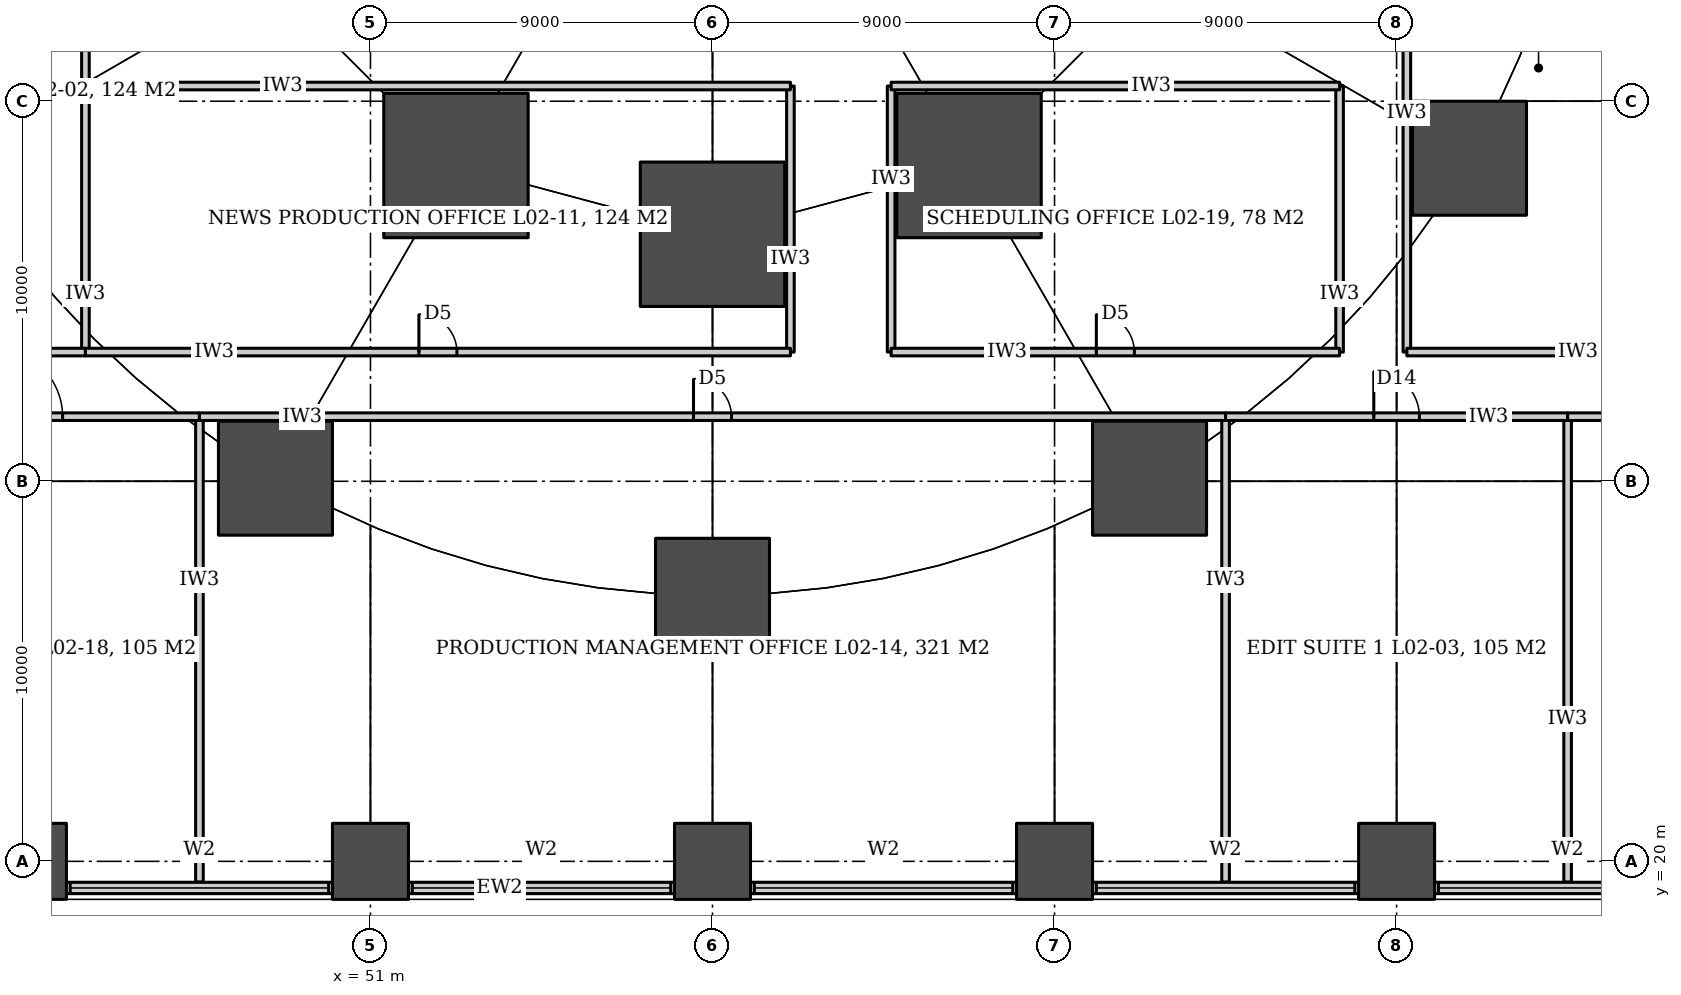
"""IFC4 building model, lengths in metres.
Left out: names, types, materials, properties, quantities, classifications, styles, units other than length and angle.
Written with IfcOpenShell. Run it as: python <this file> out.ifc"""

import sys

from ifc_helpers import new_model, si_unit, direction, frame, frame_2d, origin, origin_2d, place, context, subcontext, project, spatial, rectangle, circle, extrude, element, fill, save


model = new_model("IFC4")
c1 = context("Model", 3, precision=1e-05, world=origin(), true_north=direction((0.0, 1.0)))
c2 = subcontext(c1, "Body", "Model", "MODEL_VIEW")
j1 = project(units=[si_unit("LENGTHUNIT", "METRE"), si_unit("PLANEANGLEUNIT", "RADIAN")], contexts=[c1])
p1 = place(None, origin())
s1 = spatial("IfcSite", under=j1, at=p1, CompositionType="ELEMENT")
p2 = place(p1, origin())
s2 = spatial("IfcBuilding", under=s1, at=p2, CompositionType="ELEMENT")
p3 = place(p2, frame((0.0, 0.0, 15.0)))
s3 = spatial("IfcBuildingStorey", under=s2, at=p3, CompositionType="ELEMENT", Elevation=15.0)
for number, where, z_axis, x_axis in (
    (1, (42.0, 20.0, 0.0), (0.0, 0.0, 1.0), (1.0, 0.0, 0.0)),
    (2, (51.0, 20.0, 0.0), (0.0, 0.0, 1.0), (1.0, 0.0, 0.0)),
    (3, (60.0, 20.0, 0.0), (0.0, 0.0, 1.0), (1.0, 0.0, 0.0)),
    (4, (69.0, 20.0, 0.0), (0.0, 0.0, 1.0), (1.0, 0.0, 0.0)),
    (5, (78.0, 20.0, 0.0), (0.0, 0.0, 1.0), (1.0, 0.0, 0.0)),
):
    element("IfcColumn", number, at=place(p3, frame(where, z_axis=z_axis, x_axis=x_axis)), inside=s3, PredefinedType="COLUMN", context=c2, shape_type="SweptSolid", body=[
        extrude(rectangle(XDim=2.0, YDim=2.0, at=origin_2d()), origin(), (0.0, 0.0, 1.0), 5.0),
    ])
for number, where, z_axis, x_axis in (
    (6, (48.5, 30.081, 0.0), (0.0, 0.0, 1.0), (1.0, 0.0, 0.0)),
    (7, (60.0, 27.0, 0.0), (0.0, 0.0, 1.0), (1.0, 0.0, 0.0)),
    (8, (71.5, 30.081, 0.0), (0.0, 0.0, 1.0), (1.0, 0.0, 0.0)),
    (9, (79.919, 38.5, 0.0), (0.0, 0.0, 1.0), (1.0, 0.0, 0.0)),
):
    element("IfcColumn", number, at=place(p3, frame(where, z_axis=z_axis, x_axis=x_axis)), inside=s3, PredefinedType="COLUMN", context=c2, shape_type="SweptSolid", body=[
        extrude(circle(Radius=1.5, at=origin_2d()), origin(), (0.0, 0.0, 1.0), 5.0),
    ])
for number, where, z_axis, x_axis in (
    (10, (53.25, 38.309, 0.0), (0.0, 0.0, 1.0), (1.0, 0.0, 0.0)),
    (11, (60.0, 36.5, 0.0), (0.0, 0.0, 1.0), (1.0, 0.0, 0.0)),
    (12, (66.75, 38.309, 0.0), (0.0, 0.0, 1.0), (1.0, 0.0, 0.0)),
):
    element("IfcColumn", number, at=place(p3, frame(where, z_axis=z_axis, x_axis=x_axis)), inside=s3, PredefinedType="COLUMN", context=c2, shape_type="SweptSolid", body=[
        extrude(circle(Radius=1.9, at=origin_2d()), origin(), (0.0, 0.0, 1.0), 5.0),
    ])
p4 = place(p3, frame((43.5, 33.4, 0.0), z_axis=(0.0, 0.0, 1.0), x_axis=(0.0, 1.0, 0.0)))
e13 = element("IfcWall", 13, at=p4, inside=s3, PredefinedType="PARTITIONING", context=c2, shape_type="SweptSolid", body=[
    extrude(rectangle(XDim=7.0, YDim=0.2, at=frame_2d((3.5, 0.0))), origin(), (0.0, 0.0, 1.0), 2.08),
])
p5 = place(p3, frame((43.5, 40.4, 0.0), z_axis=(0.0, 0.0, 1.0), x_axis=(0.0, 1.0, 0.0)))
e14 = element("IfcWall", 14, at=p5, inside=s3, PredefinedType="PARTITIONING", context=c2, shape_type="SweptSolid", body=[
    extrude(rectangle(XDim=7.95, YDim=0.2, at=frame_2d((3.975, 0.0))), origin(), (0.0, 0.0, 1.0), 2.08),
])
p6 = place(p3, frame((46.5, 19.455, 0.0), z_axis=(0.0, 0.0, 1.0), x_axis=(0.0, 1.0, 0.0)))
e15 = element("IfcWall", 15, at=p6, inside=s3, PredefinedType="PARTITIONING", context=c2, shape_type="SweptSolid", body=[
    extrude(rectangle(XDim=12.245, YDim=0.2, at=frame_2d((6.123, 0.0))), origin(), (0.0, 0.0, 1.0), 2.68),
])
p7 = place(p3, frame((62.05, 33.4, 0.0), z_axis=(0.0, 0.0, 1.0), x_axis=(0.0, 1.0, 0.0)))
e16 = element("IfcWall", 16, at=p7, inside=s3, PredefinedType="PARTITIONING", context=c2, shape_type="SweptSolid", body=[
    extrude(rectangle(XDim=7.0, YDim=0.2, at=frame_2d((3.5, 0.0))), origin(), (0.0, 0.0, 1.0), 2.08),
])
p8 = place(p3, frame((64.7, 33.4, 0.0), z_axis=(0.0, 0.0, 1.0), x_axis=(0.0, 1.0, 0.0)))
e17 = element("IfcWall", 17, at=p8, inside=s3, PredefinedType="PARTITIONING", context=c2, shape_type="SweptSolid", body=[
    extrude(rectangle(XDim=7.0, YDim=0.2, at=frame_2d((3.5, 0.0))), origin(), (0.0, 0.0, 1.0), 1.48),
])
p9 = place(p3, frame((73.5, 19.455, 0.0), z_axis=(0.0, 0.0, 1.0), x_axis=(0.0, 1.0, 0.0)))
e18 = element("IfcWall", 18, at=p9, inside=s3, PredefinedType="PARTITIONING", context=c2, shape_type="SweptSolid", body=[
    extrude(rectangle(XDim=12.245, YDim=0.2, at=frame_2d((6.123, 0.0))), origin(), (0.0, 0.0, 1.0), 2.68),
])
p10 = place(p3, frame((76.5, 33.4, 0.0), z_axis=(0.0, 0.0, 1.0), x_axis=(0.0, 1.0, 0.0)))
e19 = element("IfcWall", 19, at=p10, inside=s3, PredefinedType="PARTITIONING", context=c2, shape_type="SweptSolid", body=[
    extrude(rectangle(XDim=7.0, YDim=0.2, at=frame_2d((3.5, 0.0))), origin(), (0.0, 0.0, 1.0), 2.08),
])
p11 = place(p3, frame((78.27, 33.4, 0.0), z_axis=(0.0, 0.0, 1.0), x_axis=(0.0, 1.0, 0.0)))
e20 = element("IfcWall", 20, at=p11, inside=s3, PredefinedType="PARTITIONING", context=c2, shape_type="SweptSolid", body=[
    extrude(rectangle(XDim=14.95, YDim=0.2, at=frame_2d((7.475, 0.0))), origin(), (0.0, 0.0, 1.0), 2.08),
])
p12 = place(p3, frame((82.5, 19.455, 0.0), z_axis=(0.0, 0.0, 1.0), x_axis=(0.0, 1.0, 0.0)))
e21 = element("IfcWall", 21, at=p12, inside=s3, PredefinedType="PARTITIONING", context=c2, shape_type="SweptSolid", body=[
    extrude(rectangle(XDim=12.245, YDim=0.2, at=frame_2d((6.123, 0.0))), origin(), (0.0, 0.0, 1.0), 2.68),
])
p13 = place(p3, frame((37.5, 31.7, 0.0), z_axis=(0.0, 0.0, 1.0), x_axis=(1.0, 0.0, 0.0)))
e22 = element("IfcWall", 22, at=p13, inside=s3, PredefinedType="PARTITIONING", context=c2, shape_type="SweptSolid", body=[
    extrude(rectangle(XDim=9.0, YDim=0.2, at=frame_2d((4.5, 0.0))), origin(), (0.0, 0.0, 1.0), 2.68),
])
p14 = place(p13, frame((3.6, 0.0, 0.0)))
e23 = element("IfcOpeningElement", 23, at=p14, cuts=e22, PredefinedType="OPENING", context=c2, shape_type="SweptSolid", body=[
    extrude(rectangle(XDim=1.8, YDim=2.7, at=frame_2d((0.9, 1.35))), frame((0.0, 0.11, 0.0), z_axis=(0.0, -1.0, 0.0), x_axis=(1.0, 0.0, 0.0)), (0.0, 0.0, 1.0), 0.22),
])
p15 = place(p3, frame((46.5, 31.7, 0.0), z_axis=(0.0, 0.0, 1.0), x_axis=(1.0, 0.0, 0.0)))
e24 = element("IfcWall", 24, at=p15, inside=s3, PredefinedType="PARTITIONING", context=c2, shape_type="SweptSolid", body=[
    extrude(rectangle(XDim=27.0, YDim=0.2, at=frame_2d((13.5, 0.0))), origin(), (0.0, 0.0, 1.0), 2.08),
])
p16 = place(p15, frame((13.0, 0.0, 0.0)))
e25 = element("IfcOpeningElement", 25, at=p16, cuts=e24, PredefinedType="OPENING", context=c2, shape_type="SweptSolid", body=[
    extrude(rectangle(XDim=1.0, YDim=2.1, at=frame_2d((0.5, 1.05))), frame((0.0, 0.11, 0.0), z_axis=(0.0, -1.0, 0.0), x_axis=(1.0, 0.0, 0.0)), (0.0, 0.0, 1.0), 0.22),
])
p17 = place(p3, frame((73.5, 31.7, 0.0), z_axis=(0.0, 0.0, 1.0), x_axis=(1.0, 0.0, 0.0)))
e26 = element("IfcWall", 26, at=p17, inside=s3, PredefinedType="PARTITIONING", context=c2, shape_type="SweptSolid", body=[
    extrude(rectangle(XDim=9.0, YDim=0.2, at=frame_2d((4.5, 0.0))), origin(), (0.0, 0.0, 1.0), 2.68),
])
p18 = place(p17, frame((3.9, 0.0, 0.0)))
e27 = element("IfcOpeningElement", 27, at=p18, cuts=e26, PredefinedType="OPENING", context=c2, shape_type="SweptSolid", body=[
    extrude(rectangle(XDim=1.2, YDim=2.4, at=frame_2d((0.6, 1.2))), frame((0.0, 0.11, 0.0), z_axis=(0.0, -1.0, 0.0), x_axis=(1.0, 0.0, 0.0)), (0.0, 0.0, 1.0), 0.22),
])
p19 = place(p3, frame((82.5, 31.7, 0.0), z_axis=(0.0, 0.0, 1.0), x_axis=(1.0, 0.0, 0.0)))
e28 = element("IfcWall", 28, at=p19, inside=s3, PredefinedType="PARTITIONING", context=c2, shape_type="SweptSolid", body=[
    extrude(rectangle(XDim=23.045, YDim=0.2, at=frame_2d((11.522, 0.0))), origin(), (0.0, 0.0, 1.0), 2.68),
])
p20 = place(p19, frame((10.923, 0.0, 0.0)))
e29 = element("IfcOpeningElement", 29, at=p20, cuts=e28, PredefinedType="OPENING", context=c2, shape_type="SweptSolid", body=[
    extrude(rectangle(XDim=1.2, YDim=2.4, at=frame_2d((0.6, 1.2))), frame((0.0, 0.11, 0.0), z_axis=(0.0, -1.0, 0.0), x_axis=(1.0, 0.0, 0.0)), (0.0, 0.0, 1.0), 0.22),
])
p21 = place(p3, frame((34.8, 33.4, 0.0), z_axis=(0.0, 0.0, 1.0), x_axis=(1.0, 0.0, 0.0)))
e30 = element("IfcWall", 30, at=p21, inside=s3, PredefinedType="PARTITIONING", context=c2, shape_type="SweptSolid", body=[
    extrude(rectangle(XDim=8.7, YDim=0.2, at=frame_2d((4.35, 0.0))), origin(), (0.0, 0.0, 1.0), 2.68),
])
p22 = place(p3, frame((43.5, 33.4, 0.0), z_axis=(0.0, 0.0, 1.0), x_axis=(1.0, 0.0, 0.0)))
e31 = element("IfcWall", 31, at=p22, inside=s3, PredefinedType="PARTITIONING", context=c2, shape_type="SweptSolid", body=[
    extrude(rectangle(XDim=18.55, YDim=0.2, at=frame_2d((9.275, 0.0))), origin(), (0.0, 0.0, 1.0), 2.08),
])
p23 = place(p22, frame((8.775, 0.0, 0.0)))
e32 = element("IfcOpeningElement", 32, at=p23, cuts=e31, PredefinedType="OPENING", context=c2, shape_type="SweptSolid", body=[
    extrude(rectangle(XDim=1.0, YDim=2.1, at=frame_2d((0.5, 1.05))), frame((0.0, 0.11, 0.0), z_axis=(0.0, -1.0, 0.0), x_axis=(1.0, 0.0, 0.0)), (0.0, 0.0, 1.0), 0.22),
])
p24 = place(p3, frame((64.7, 33.4, 0.0), z_axis=(0.0, 0.0, 1.0), x_axis=(1.0, 0.0, 0.0)))
e33 = element("IfcWall", 33, at=p24, inside=s3, PredefinedType="PARTITIONING", context=c2, shape_type="SweptSolid", body=[
    extrude(rectangle(XDim=11.8, YDim=0.2, at=frame_2d((5.9, 0.0))), origin(), (0.0, 0.0, 1.0), 2.08),
])
p25 = place(p24, frame((5.4, 0.0, 0.0)))
e34 = element("IfcOpeningElement", 34, at=p25, cuts=e33, PredefinedType="OPENING", context=c2, shape_type="SweptSolid", body=[
    extrude(rectangle(XDim=1.0, YDim=2.1, at=frame_2d((0.5, 1.05))), frame((0.0, 0.11, 0.0), z_axis=(0.0, -1.0, 0.0), x_axis=(1.0, 0.0, 0.0)), (0.0, 0.0, 1.0), 0.22),
])
p26 = place(p3, frame((78.27, 33.4, 0.0), z_axis=(0.0, 0.0, 1.0), x_axis=(1.0, 0.0, 0.0)))
e35 = element("IfcWall", 35, at=p26, inside=s3, PredefinedType="PARTITIONING", context=c2, shape_type="SweptSolid", body=[
    extrude(rectangle(XDim=6.93, YDim=0.2, at=frame_2d((3.465, 0.0))), origin(), (0.0, 0.0, 1.0), 2.68),
])
p27 = place(p3, frame((43.5, 40.4, 0.0), z_axis=(0.0, 0.0, 1.0), x_axis=(1.0, 0.0, 0.0)))
e36 = element("IfcWall", 36, at=p27, inside=s3, PredefinedType="PARTITIONING", context=c2, shape_type="SweptSolid", body=[
    extrude(rectangle(XDim=18.55, YDim=0.2, at=frame_2d((9.275, 0.0))), origin(), (0.0, 0.0, 1.0), 1.48),
])
p28 = place(p3, frame((64.7, 40.4, 0.0), z_axis=(0.0, 0.0, 1.0), x_axis=(1.0, 0.0, 0.0)))
e37 = element("IfcWall", 37, at=p28, inside=s3, PredefinedType="PARTITIONING", context=c2, shape_type="SweptSolid", body=[
    extrude(rectangle(XDim=11.8, YDim=0.2, at=frame_2d((5.9, 0.0))), origin(), (0.0, 0.0, 1.0), 1.48),
])
p29 = place(p3, frame((25.0, 19.3, 0.0), z_axis=(0.0, 0.0, 1.0), x_axis=(1.0, 0.0, 0.0)))
e38 = element("IfcWall", 38, at=p29, inside=s3, PredefinedType="SOLIDWALL", context=c2, shape_type="SweptSolid", body=[
    extrude(rectangle(XDim=70.0, YDim=0.3, at=frame_2d((35.0, 0.0))), origin(), (0.0, 0.0, 1.0), 4.7),
])
p30 = place(p29, frame((9.1, 0.0, 1.2)))
e39 = element("IfcOpeningElement", 39, at=p30, cuts=e38, PredefinedType="OPENING", context=c2, shape_type="SweptSolid", body=[
    extrude(rectangle(XDim=6.8, YDim=1.5, at=frame_2d((3.4, 0.75))), frame((0.0, 0.16, 0.0), z_axis=(0.0, -1.0, 0.0), x_axis=(1.0, 0.0, 0.0)), (0.0, 0.0, 1.0), 0.32),
])
p31 = place(p29, frame((18.1, 0.0, 1.2)))
e40 = element("IfcOpeningElement", 40, at=p31, cuts=e38, PredefinedType="OPENING", context=c2, shape_type="SweptSolid", body=[
    extrude(rectangle(XDim=6.8, YDim=1.5, at=frame_2d((3.4, 0.75))), frame((0.0, 0.16, 0.0), z_axis=(0.0, -1.0, 0.0), x_axis=(1.0, 0.0, 0.0)), (0.0, 0.0, 1.0), 0.32),
])
p32 = place(p29, frame((27.1, 0.0, 1.2)))
e41 = element("IfcOpeningElement", 41, at=p32, cuts=e38, PredefinedType="OPENING", context=c2, shape_type="SweptSolid", body=[
    extrude(rectangle(XDim=6.8, YDim=1.5, at=frame_2d((3.4, 0.75))), frame((0.0, 0.16, 0.0), z_axis=(0.0, -1.0, 0.0), x_axis=(1.0, 0.0, 0.0)), (0.0, 0.0, 1.0), 0.32),
])
p33 = place(p29, frame((36.1, 0.0, 1.2)))
e42 = element("IfcOpeningElement", 42, at=p33, cuts=e38, PredefinedType="OPENING", context=c2, shape_type="SweptSolid", body=[
    extrude(rectangle(XDim=6.8, YDim=1.5, at=frame_2d((3.4, 0.75))), frame((0.0, 0.16, 0.0), z_axis=(0.0, -1.0, 0.0), x_axis=(1.0, 0.0, 0.0)), (0.0, 0.0, 1.0), 0.32),
])
p34 = place(p29, frame((45.1, 0.0, 1.2)))
e43 = element("IfcOpeningElement", 43, at=p34, cuts=e38, PredefinedType="OPENING", context=c2, shape_type="SweptSolid", body=[
    extrude(rectangle(XDim=6.8, YDim=1.5, at=frame_2d((3.4, 0.75))), frame((0.0, 0.16, 0.0), z_axis=(0.0, -1.0, 0.0), x_axis=(1.0, 0.0, 0.0)), (0.0, 0.0, 1.0), 0.32),
])
p35 = place(p29, frame((54.1, 0.0, 1.2)))
e44 = element("IfcOpeningElement", 44, at=p35, cuts=e38, PredefinedType="OPENING", context=c2, shape_type="SweptSolid", body=[
    extrude(rectangle(XDim=6.8, YDim=1.5, at=frame_2d((3.4, 0.75))), frame((0.0, 0.16, 0.0), z_axis=(0.0, -1.0, 0.0), x_axis=(1.0, 0.0, 0.0)), (0.0, 0.0, 1.0), 0.32),
])
p36 = place(p14, origin())
e45 = element("IfcDoor", 45, at=p36, inside=s3, OperationType="DOUBLE_DOOR_DOUBLE_SWING", PredefinedType="DOOR", context=c2, shape_type="SweptSolid", body=[
    extrude(rectangle(XDim=1.8, YDim=2.7, at=frame_2d((0.9, 1.35))), frame((0.0, 0.025, 0.0), z_axis=(0.0, -1.0, 0.0), x_axis=(1.0, 0.0, 0.0)), (0.0, 0.0, 1.0), 0.05),
])
fill(e23, e45)
p37 = place(p18, origin())
e46 = element("IfcDoor", 46, at=p37, inside=s3, OperationType="SINGLE_SWING_LEFT", PredefinedType="DOOR", context=c2, shape_type="SweptSolid", body=[
    extrude(rectangle(XDim=1.2, YDim=2.4, at=frame_2d((0.6, 1.2))), frame((0.0, 0.025, 0.0), z_axis=(0.0, -1.0, 0.0), x_axis=(1.0, 0.0, 0.0)), (0.0, 0.0, 1.0), 0.05),
])
fill(e27, e46)
p38 = place(p16, origin())
e47 = element("IfcDoor", 47, at=p38, inside=s3, OperationType="SINGLE_SWING_LEFT", PredefinedType="DOOR", context=c2, shape_type="SweptSolid", body=[
    extrude(rectangle(XDim=1.0, YDim=2.1, at=frame_2d((0.5, 1.05))), frame((0.0, 0.025, 0.0), z_axis=(0.0, -1.0, 0.0), x_axis=(1.0, 0.0, 0.0)), (0.0, 0.0, 1.0), 0.05),
])
fill(e25, e47)
p39 = place(p23, origin())
e48 = element("IfcDoor", 48, at=p39, inside=s3, OperationType="SINGLE_SWING_LEFT", PredefinedType="DOOR", context=c2, shape_type="SweptSolid", body=[
    extrude(rectangle(XDim=1.0, YDim=2.1, at=frame_2d((0.5, 1.05))), frame((0.0, 0.025, 0.0), z_axis=(0.0, -1.0, 0.0), x_axis=(1.0, 0.0, 0.0)), (0.0, 0.0, 1.0), 0.05),
])
fill(e32, e48)
p40 = place(p25, origin())
e49 = element("IfcDoor", 49, at=p40, inside=s3, OperationType="SINGLE_SWING_LEFT", PredefinedType="DOOR", context=c2, shape_type="SweptSolid", body=[
    extrude(rectangle(XDim=1.0, YDim=2.1, at=frame_2d((0.5, 1.05))), frame((0.0, 0.025, 0.0), z_axis=(0.0, -1.0, 0.0), x_axis=(1.0, 0.0, 0.0)), (0.0, 0.0, 1.0), 0.05),
])
fill(e34, e49)
p41 = place(p31, origin())
e50 = element("IfcWindow", 50, at=p41, inside=s3, PartitioningType="SINGLE_PANEL", PredefinedType="WINDOW", context=c2, shape_type="SweptSolid", body=[
    extrude(rectangle(XDim=6.8, YDim=1.5, at=frame_2d((3.4, 0.75))), frame((0.0, 0.03, 0.0), z_axis=(0.0, -1.0, 0.0), x_axis=(1.0, 0.0, 0.0)), (0.0, 0.0, 1.0), 0.06),
])
fill(e40, e50)
p42 = place(p32, origin())
e51 = element("IfcWindow", 51, at=p42, inside=s3, PartitioningType="SINGLE_PANEL", PredefinedType="WINDOW", context=c2, shape_type="SweptSolid", body=[
    extrude(rectangle(XDim=6.8, YDim=1.5, at=frame_2d((3.4, 0.75))), frame((0.0, 0.03, 0.0), z_axis=(0.0, -1.0, 0.0), x_axis=(1.0, 0.0, 0.0)), (0.0, 0.0, 1.0), 0.06),
])
fill(e41, e51)
p43 = place(p33, origin())
e52 = element("IfcWindow", 52, at=p43, inside=s3, PartitioningType="SINGLE_PANEL", PredefinedType="WINDOW", context=c2, shape_type="SweptSolid", body=[
    extrude(rectangle(XDim=6.8, YDim=1.5, at=frame_2d((3.4, 0.75))), frame((0.0, 0.03, 0.0), z_axis=(0.0, -1.0, 0.0), x_axis=(1.0, 0.0, 0.0)), (0.0, 0.0, 1.0), 0.06),
])
fill(e42, e52)
p44 = place(p34, origin())
e53 = element("IfcWindow", 53, at=p44, inside=s3, PartitioningType="SINGLE_PANEL", PredefinedType="WINDOW", context=c2, shape_type="SweptSolid", body=[
    extrude(rectangle(XDim=6.8, YDim=1.5, at=frame_2d((3.4, 0.75))), frame((0.0, 0.03, 0.0), z_axis=(0.0, -1.0, 0.0), x_axis=(1.0, 0.0, 0.0)), (0.0, 0.0, 1.0), 0.06),
])
fill(e43, e53)
p45 = place(p35, origin())
e54 = element("IfcWindow", 54, at=p45, inside=s3, PartitioningType="SINGLE_PANEL", PredefinedType="WINDOW", context=c2, shape_type="SweptSolid", body=[
    extrude(rectangle(XDim=6.8, YDim=1.5, at=frame_2d((3.4, 0.75))), frame((0.0, 0.03, 0.0), z_axis=(0.0, -1.0, 0.0), x_axis=(1.0, 0.0, 0.0)), (0.0, 0.0, 1.0), 0.06),
])
fill(e44, e54)
save(model, sys.argv[1])
